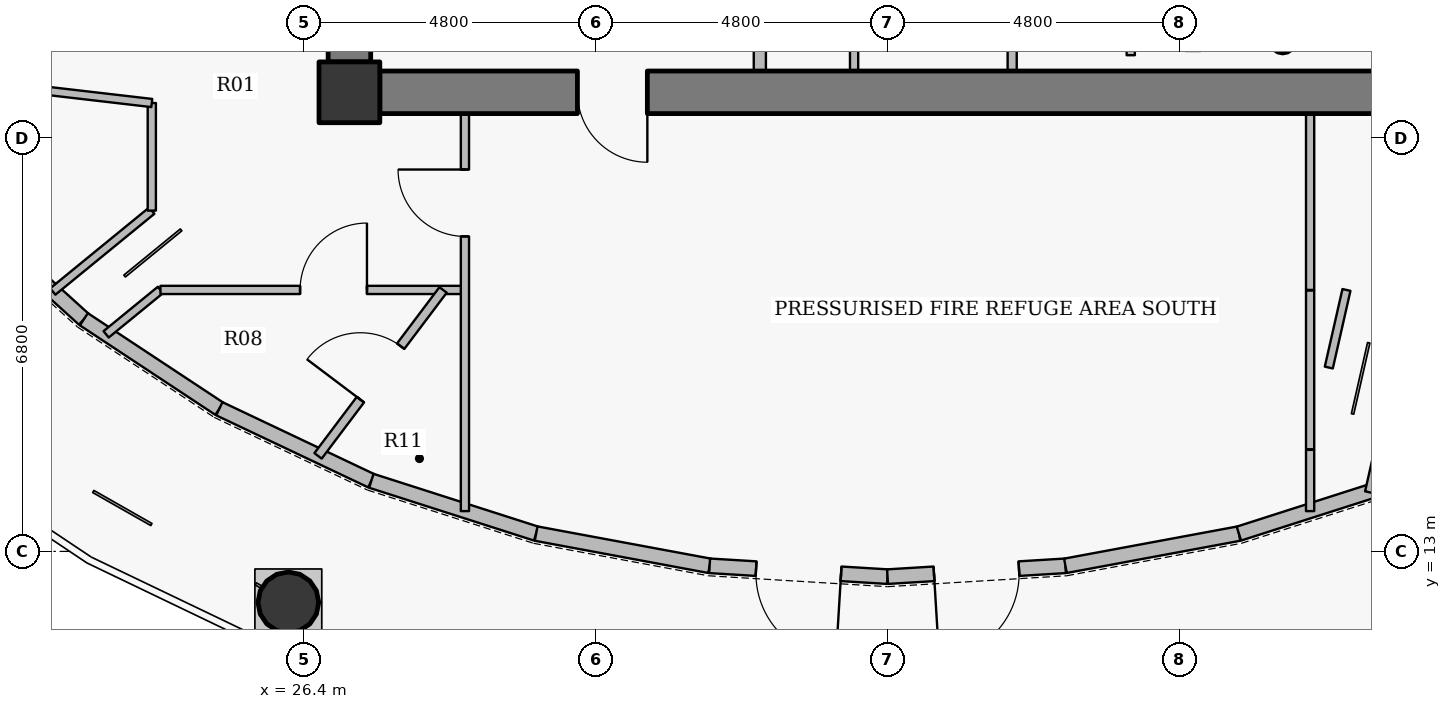
"""IFC4 building model, lengths in metres.
Left out: names, types, materials, properties, quantities, classifications, styles, units other than length and angle.
Written with IfcOpenShell. Run it as: python <this file> out.ifc"""

import sys

from ifc_helpers import new_model, si_unit, direction, frame, frame_2d, origin, origin_2d, place, context, subcontext, project, spatial, rectangle, hollow_circle, extrude, source, transform, mapped, element, fill, save


model = new_model("IFC4")
c1 = context("Model", 3, precision=1e-05, world=origin(), true_north=direction((0.0, 1.0)))
c2 = subcontext(c1, "Body", "Model", "MODEL_VIEW")
j1 = project(units=[si_unit("LENGTHUNIT", "METRE"), si_unit("PLANEANGLEUNIT", "RADIAN")], contexts=[c1])
p1 = place(None, origin())
s1 = spatial("IfcSite", under=j1, at=p1, CompositionType="ELEMENT")
p2 = place(p1, origin())
s2 = spatial("IfcBuilding", under=s1, at=p2, CompositionType="ELEMENT")
p3 = place(p2, frame((0.0, 0.0, 318.0)))
s3 = spatial("IfcBuildingStorey", under=s2, at=p3, CompositionType="ELEMENT", Elevation=318.0)
p4 = place(p3, frame((27.15, 20.55, 0.0), z_axis=(0.0, 0.0, 1.0), x_axis=(1.0, 0.0, 0.0)))
e1 = element("IfcColumn", 1, at=p4, inside=s3, PredefinedType="COLUMN", context=c2, shape_type="SweptSolid", body=[
    extrude(rectangle(XDim=1.0, YDim=1.0, at=origin_2d()), origin(), (0.0, 0.0, 1.0), 6.0),
])
p5 = place(p3, frame((42.5, 21.4, 0.0), z_axis=(0.0, 0.0, 1.0), x_axis=(1.0, 0.0, 0.0)))
e2 = element("IfcColumn", 2, at=p5, inside=s3, PredefinedType="COLUMN", context=c2, shape_type="SweptSolid", body=[
    extrude(hollow_circle(Radius=0.203, WallThickness=0.016, at=origin_2d()), origin(), (0.0, 0.0, 1.0), 6.0),
])
p6 = place(p3, frame((44.35, 20.55, 0.0), z_axis=(0.0, 0.0, 1.0), x_axis=(-1.0, 0.0, 0.0)))
e3 = element("IfcWall", 3, at=p6, inside=s3, PredefinedType="SHEAR", context=c2, shape_type="SweptSolid", body=[
    extrude(rectangle(XDim=16.7, YDim=0.7, at=frame_2d((8.35, 0.0))), origin(), (0.0, 0.0, 1.0), 5.3),
])
p7 = place(p6, frame((12.3, 0.0, 0.0)))
e4 = element("IfcOpeningElement", 4, at=p7, cuts=e3, PredefinedType="OPENING", context=c2, shape_type="SweptSolid", body=[
    extrude(rectangle(XDim=1.15, YDim=2.15, at=origin_2d()), frame((0.575, 0.36, 1.075), z_axis=(0.0, -1.0, 0.0), x_axis=(1.0, 0.0, 0.0)), (0.0, 0.0, 1.0), 0.72),
])
p8 = place(p3, frame((27.15, 21.05, 0.0), z_axis=(0.0, 0.0, 1.0), x_axis=(0.0, 1.0, 0.0)))
e5 = element("IfcWall", 5, at=p8, inside=s3, PredefinedType="SHEAR", context=c2, shape_type="SweptSolid", body=[
    extrude(rectangle(XDim=11.9, YDim=0.7, at=frame_2d((5.95, 0.0))), origin(), (0.0, 0.0, 1.0), 5.3),
])
p9 = place(p8, frame((1.025, 0.0, 0.0)))
e6 = element("IfcOpeningElement", 6, at=p9, cuts=e5, PredefinedType="OPENING", context=c2, shape_type="SweptSolid", body=[
    extrude(rectangle(XDim=1.15, YDim=2.15, at=origin_2d()), frame((0.575, 0.36, 1.075), z_axis=(0.0, -1.0, 0.0), x_axis=(1.0, 0.0, 0.0)), (0.0, 0.0, 1.0), 0.72),
])
p10 = place(p3, frame((26.146, 12.161, 0.0), z_axis=(0.0, 0.0, 1.0), x_axis=(1.0, 0.0, 0.0)))
e7 = element("IfcColumn", 7, at=p10, inside=s3, PredefinedType="COLUMN", context=c2, shape_type="SweptSolid", body=[
    extrude(hollow_circle(Radius=0.5, WallThickness=0.032, at=origin_2d()), origin(), (0.0, 0.0, 1.0), 5.75),
])
p11 = place(p3, frame((22.783, 16.818, 0.0), z_axis=(0.0, 0.0, 1.0), x_axis=(-0.741265131079, 0.671212340058, 0.0)))
e8 = element("IfcWall", 8, at=p11, inside=s3, PredefinedType="SOLIDWALL", context=c2, shape_type="SweptSolid", body=[
    extrude(rectangle(XDim=2.565, YDim=0.24, at=frame_2d((1.282, 0.0))), origin(), (0.0, 0.0, 1.0), 2.832),
])
p12 = place(p3, frame((25.011, 15.346, 0.0), z_axis=(0.0, 0.0, 1.0), x_axis=(-0.834405901953, 0.551150424827, 0.0)))
e9 = element("IfcWall", 9, at=p12, inside=s3, PredefinedType="SOLIDWALL", context=c2, shape_type="SweptSolid", body=[
    extrude(rectangle(XDim=2.67, YDim=0.24, at=frame_2d((1.335, 0.0))), origin(), (0.0, 0.0, 1.0), 2.832),
])
p13 = place(p3, frame((27.511, 14.161, 0.0), z_axis=(0.0, 0.0, 1.0), x_axis=(-0.903637179904, 0.428298782505, 0.0)))
e10 = element("IfcWall", 10, at=p13, inside=s3, PredefinedType="SOLIDWALL", context=c2, shape_type="SweptSolid", body=[
    extrude(rectangle(XDim=2.766, YDim=0.24, at=frame_2d((1.383, 0.0))), origin(), (0.0, 0.0, 1.0), 4.235),
])
p14 = place(p3, frame((30.221, 13.293, 0.0), z_axis=(0.0, 0.0, 1.0), x_axis=(-0.952332464146, 0.305062088326, 0.0)))
e11 = element("IfcWall", 11, at=p14, inside=s3, PredefinedType="SOLIDWALL", context=c2, shape_type="SweptSolid", body=[
    extrude(rectangle(XDim=2.846, YDim=0.24, at=frame_2d((1.423, 0.0))), origin(), (0.0, 0.0, 1.0), 4.235),
])
p15 = place(p3, frame((33.074, 12.763, 0.0), z_axis=(0.0, 0.0, 1.0), x_axis=(-0.983195423776, 0.182556179481, 0.0)))
e12 = element("IfcWall", 12, at=p15, inside=s3, PredefinedType="SOLIDWALL", context=c2, shape_type="SweptSolid", body=[
    extrude(rectangle(XDim=2.902, YDim=0.24, at=frame_2d((1.451, 0.0))), origin(), (0.0, 0.0, 1.0), 5.75),
])
p16 = place(p3, frame((36.0, 12.585, 0.0), z_axis=(0.0, 0.0, 1.0), x_axis=(-0.998149855878, 0.060801852035, 0.0)))
e13 = element("IfcWall", 13, at=p16, inside=s3, PredefinedType="SOLIDWALL", context=c2, shape_type="SweptSolid", body=[
    extrude(rectangle(XDim=2.931, YDim=0.24, at=frame_2d((1.466, 0.0))), origin(), (0.0, 0.0, 1.0), 4.235),
])
p17 = place(p16, frame((0.766, 0.0, 0.0)))
e14 = element("IfcOpeningElement", 14, at=p17, cuts=e13, PredefinedType="OPENING", context=c2, shape_type="SweptSolid", body=[
    extrude(rectangle(XDim=1.4, YDim=2.2, at=origin_2d()), frame((0.7, 0.13, 1.1), z_axis=(0.0, -1.0, 0.0), x_axis=(1.0, 0.0, 0.0)), (0.0, 0.0, 1.0), 0.26),
])
p18 = place(p3, frame((38.926, 12.763, 0.0), z_axis=(0.0, 0.0, 1.0), x_axis=(-0.998149855878, -0.060801852035, 0.0)))
e15 = element("IfcWall", 15, at=p18, inside=s3, PredefinedType="SOLIDWALL", context=c2, shape_type="SweptSolid", body=[
    extrude(rectangle(XDim=2.931, YDim=0.24, at=frame_2d((1.466, 0.0))), origin(), (0.0, 0.0, 1.0), 4.235),
])
p19 = place(p18, frame((0.766, 0.0, 0.0)))
e16 = element("IfcOpeningElement", 16, at=p19, cuts=e15, PredefinedType="OPENING", context=c2, shape_type="SweptSolid", body=[
    extrude(rectangle(XDim=1.4, YDim=2.2, at=origin_2d()), frame((0.7, 0.13, 1.1), z_axis=(0.0, -1.0, 0.0), x_axis=(1.0, 0.0, 0.0)), (0.0, 0.0, 1.0), 0.26),
])
p20 = place(p3, frame((41.779, 13.293, 0.0), z_axis=(0.0, 0.0, 1.0), x_axis=(-0.983195423776, -0.182556179481, 0.0)))
e17 = element("IfcWall", 17, at=p20, inside=s3, PredefinedType="SOLIDWALL", context=c2, shape_type="SweptSolid", body=[
    extrude(rectangle(XDim=2.902, YDim=0.24, at=frame_2d((1.451, 0.0))), origin(), (0.0, 0.0, 1.0), 4.235),
])
p21 = place(p3, frame((44.489, 14.161, 0.0), z_axis=(0.0, 0.0, 1.0), x_axis=(-0.952332464146, -0.305062088326, 0.0)))
e18 = element("IfcWall", 18, at=p21, inside=s3, PredefinedType="SOLIDWALL", context=c2, shape_type="SweptSolid", body=[
    extrude(rectangle(XDim=2.846, YDim=0.24, at=frame_2d((1.423, 0.0))), origin(), (0.0, 0.0, 1.0), 2.832),
])
p22 = place(p3, frame((23.149, 16.57, 0.0), z_axis=(0.0, 0.0, 1.0), x_axis=(0.774324787676, 0.632788371568, 0.0)))
e19 = element("IfcWall", 19, at=p22, inside=s3, PredefinedType="PARTITIONING", context=c2, shape_type="SweptSolid", body=[
    extrude(rectangle(XDim=1.154, YDim=0.135, at=frame_2d((0.577, 0.0))), origin(), (0.0, 0.0, 1.0), 5.335),
])
p23 = place(p3, frame((24.042, 17.3, 0.0), z_axis=(0.0, 0.0, 1.0), x_axis=(1.0, 0.0, 0.0)))
e20 = element("IfcWall", 20, at=p23, inside=s3, PredefinedType="PARTITIONING", context=c2, shape_type="SweptSolid", body=[
    extrude(rectangle(XDim=5.008, YDim=0.135, at=frame_2d((2.504, 0.0))), origin(), (0.0, 0.0, 1.0), 5.335),
])
p24 = place(p23, frame((2.296, 0.0, 0.0)))
e21 = element("IfcOpeningElement", 21, at=p24, cuts=e20, PredefinedType="OPENING", context=c2, shape_type="SweptSolid", body=[
    extrude(rectangle(XDim=1.1, YDim=2.15, at=origin_2d()), frame((0.55, 0.078, 1.075), z_axis=(0.0, -1.0, 0.0), x_axis=(1.0, 0.0, 0.0)), (0.0, 0.0, 1.0), 0.155),
])
p25 = place(p3, frame((26.634, 14.571, 0.0), z_axis=(0.0, 0.0, 1.0), x_axis=(0.601804670705, 0.79864331107, 0.0)))
e22 = element("IfcWall", 22, at=p25, inside=s3, PredefinedType="PARTITIONING", context=c2, shape_type="SweptSolid", body=[
    extrude(rectangle(XDim=3.417, YDim=0.15, at=frame_2d((1.708, 0.0))), origin(), (0.0, 0.0, 1.0), 5.335),
])
p26 = place(p25, frame((1.158, 0.0, 0.0)))
e23 = element("IfcOpeningElement", 23, at=p26, cuts=e22, PredefinedType="OPENING", context=c2, shape_type="SweptSolid", body=[
    extrude(rectangle(XDim=1.1, YDim=2.15, at=origin_2d()), frame((0.55, 0.085, 1.075), z_axis=(0.0, -1.0, 0.0), x_axis=(1.0, 0.0, 0.0)), (0.0, 0.0, 1.0), 0.17),
])
p27 = place(p3, frame((29.05, 13.663, 0.0), z_axis=(0.0, 0.0, 1.0), x_axis=(0.0, 1.0, 0.0)))
e24 = element("IfcWall", 24, at=p27, inside=s3, PredefinedType="PARTITIONING", context=c2, shape_type="SweptSolid", body=[
    extrude(rectangle(XDim=6.537, YDim=0.135, at=frame_2d((3.269, 0.0))), origin(), (0.0, 0.0, 1.0), 4.235),
])
p28 = place(p27, frame((4.517, 0.0, 0.0)))
e25 = element("IfcOpeningElement", 25, at=p28, cuts=e24, PredefinedType="OPENING", context=c2, shape_type="SweptSolid", body=[
    extrude(rectangle(XDim=1.1, YDim=2.15, at=origin_2d()), frame((0.55, 0.078, 1.075), z_axis=(0.0, -1.0, 0.0), x_axis=(1.0, 0.0, 0.0)), (0.0, 0.0, 1.0), 0.155),
])
p29 = place(p3, frame((33.9, 20.9, 0.0), z_axis=(0.0, 0.0, 1.0), x_axis=(0.0, 1.0, 0.0)))
e26 = element("IfcWall", 26, at=p29, inside=s3, PredefinedType="PARTITIONING", context=c2, shape_type="SweptSolid", body=[
    extrude(rectangle(XDim=6.65, YDim=0.2, at=frame_2d((3.325, 0.0))), origin(), (0.0, 0.0, 1.0), 5.335),
])
p30 = place(p29, frame((1.323, 0.0, 0.0)))
e27 = element("IfcOpeningElement", 27, at=p30, cuts=e26, PredefinedType="OPENING", context=c2, shape_type="SweptSolid", body=[
    extrude(rectangle(XDim=1.15, YDim=2.15, at=origin_2d()), frame((0.575, 0.11, 1.075), z_axis=(0.0, -1.0, 0.0), x_axis=(1.0, 0.0, 0.0)), (0.0, 0.0, 1.0), 0.22),
])
p31 = place(p3, frame((35.45, 20.9, 0.0), z_axis=(0.0, 0.0, 1.0), x_axis=(0.0, 1.0, 0.0)))
e28 = element("IfcWall", 28, at=p31, inside=s3, PredefinedType="PARTITIONING", context=c2, shape_type="SweptSolid", body=[
    extrude(rectangle(XDim=2.8, YDim=0.135, at=frame_2d((1.4, 0.0))), origin(), (0.0, 0.0, 1.0), 5.335),
])
p32 = place(p31, frame((0.85, 0.0, 0.0)))
e29 = element("IfcOpeningElement", 29, at=p32, cuts=e28, PredefinedType="OPENING", context=c2, shape_type="SweptSolid", body=[
    extrude(rectangle(XDim=1.1, YDim=2.15, at=origin_2d()), frame((0.55, 0.078, 1.075), z_axis=(0.0, -1.0, 0.0), x_axis=(1.0, 0.0, 0.0)), (0.0, 0.0, 1.0), 0.155),
])
p33 = place(p3, frame((38.05, 20.38, 0.0), z_axis=(0.0, 0.0, 1.0), x_axis=(0.0, 1.0, 0.0)))
e30 = element("IfcWall", 30, at=p33, inside=s3, PredefinedType="PARTITIONING", context=c2, shape_type="SweptSolid", body=[
    extrude(rectangle(XDim=3.32, YDim=0.15, at=frame_2d((1.66, 0.0))), origin(), (0.0, 0.0, 1.0), 5.285),
])
p34 = place(p3, frame((42.95, 13.663, 0.0), z_axis=(0.0, 0.0, 1.0), x_axis=(0.0, 1.0, 0.0)))
e31 = element("IfcWall", 31, at=p34, inside=s3, PredefinedType="PARTITIONING", context=c2, shape_type="SweptSolid", body=[
    extrude(rectangle(XDim=1.007, YDim=0.135, at=frame_2d((0.504, 0.0))), origin(), (0.0, 0.0, 1.0), 5.75),
])
p35 = place(p3, frame((42.95, 17.3, 0.0), z_axis=(0.0, 0.0, 1.0), x_axis=(0.0, 1.0, 0.0)))
e32 = element("IfcWall", 32, at=p35, inside=s3, PredefinedType="PARTITIONING", context=c2, shape_type="SweptSolid", body=[
    extrude(rectangle(XDim=2.9, YDim=0.135, at=frame_2d((1.45, 0.0))), origin(), (0.0, 0.0, 1.0), 5.75),
])
p36 = place(p3, frame((40.0, 23.7, 0.0), z_axis=(0.0, 0.0, 1.0), x_axis=(0.0, -1.0, 0.0)))
e33 = element("IfcWall", 33, at=p36, inside=s3, PredefinedType="PARTITIONING", context=c2, shape_type="SweptSolid", body=[
    extrude(rectangle(XDim=2.54, YDim=0.135, at=frame_2d((1.27, 0.0))), origin(), (0.0, 0.0, 1.0), 5.285),
])
p37 = place(p3, frame((42.95, 17.29, 0.0), z_axis=(0.0, 0.0, 1.0), x_axis=(0.0, -1.0, 0.0)))
e34 = element("IfcWall", 34, at=p37, inside=s3, PredefinedType="PARTITIONING", context=c2, shape_type="SweptSolid", body=[
    extrude(rectangle(XDim=2.61, YDim=0.135, at=frame_2d((1.305, 0.0))), origin(), (0.0, 0.0, 1.0), 5.75),
])
p38 = place(p3, frame((22.272, 17.274, 0.0), z_axis=(0.0, 0.0, 1.0), x_axis=(0.774324461251, 0.632788771003, 0.0)))
e35 = element("IfcWall", 35, at=p38, inside=s3, PredefinedType="PARTITIONING", context=c2, shape_type="SweptSolid", body=[
    extrude(rectangle(XDim=2.103, YDim=0.135, at=frame_2d((1.051, 0.0))), origin(), (0.0, 0.0, 1.0), 5.75),
])
p39 = place(p3, frame((23.9, 18.604, 0.0), z_axis=(0.0, 0.0, 1.0), x_axis=(0.0, 1.0, 0.0)))
e36 = element("IfcWall", 36, at=p39, inside=s3, PredefinedType="PARTITIONING", context=c2, shape_type="SweptSolid", body=[
    extrude(rectangle(XDim=1.77, YDim=0.135, at=frame_2d((0.885, 0.0))), origin(), (0.0, 0.0, 1.0), 5.75),
])
p40 = place(p3, frame((23.9, 20.374, 0.0), z_axis=(0.0, 0.0, 1.0), x_axis=(-0.993315464897, 0.115431309428, 0.0)))
e37 = element("IfcWall", 37, at=p40, inside=s3, PredefinedType="PARTITIONING", context=c2, shape_type="SweptSolid", body=[
    extrude(rectangle(XDim=4.833, YDim=0.135, at=frame_2d((2.417, 0.0))), origin(), (0.0, 0.0, 1.0), 5.75),
])
p41 = place(p3, frame((26.8, 21.04, 0.0), z_axis=(0.0, 0.0, 1.0), x_axis=(0.0, -1.0, 0.0)))
e38 = element("IfcWall", 38, at=p41, inside=s3, PredefinedType="PARTITIONING", context=c2, shape_type="SweptSolid", body=[
    extrude(rectangle(XDim=0.84, YDim=0.135, at=frame_2d((0.42, 0.0))), origin(), (0.0, 0.0, 1.0), 2.832),
])
p42 = place(p3, frame((27.107, 20.2, 0.0), z_axis=(0.0, 0.0, 1.0), x_axis=(1.0, 0.0, 0.0)))
e39 = element("IfcWall", 39, at=p42, inside=s3, PredefinedType="PARTITIONING", context=c2, shape_type="SweptSolid", body=[
    extrude(rectangle(XDim=0.532, YDim=0.135, at=frame_2d((0.266, 0.0))), origin(), (0.0, 0.0, 1.0), 4.235),
])
p43 = place(p3, frame((44.676, 17.3, 0.0), z_axis=(0.0, 0.0, 1.0), x_axis=(-0.221565425892, -0.975145508142, 0.0)))
e40 = element("IfcWall", 40, at=p43, inside=s3, PredefinedType="PARTITIONING", context=c2, shape_type="SweptSolid", body=[
    extrude(rectangle(XDim=3.411, YDim=0.135, at=frame_2d((1.706, 0.0))), origin(), (0.0, 0.0, 1.0), 5.75),
])
p44 = place(p3, frame((43.258, 16.024, 0.0), z_axis=(0.0, 0.0, 1.0), x_axis=(0.221588855945, 0.975140184241, 0.0)))
e41 = element("IfcWall", 41, at=p44, inside=s3, PredefinedType="PARTITIONING", context=c2, shape_type="SweptSolid", body=[
    extrude(rectangle(XDim=1.309, YDim=0.135, at=frame_2d((0.654, 0.0))), origin(), (0.0, 0.0, 1.0), 5.75),
])
m1 = source(origin(), c2, "Body", "SweptSolid", [
    extrude(rectangle(XDim=1.4, YDim=2.2, at=origin_2d()), frame((0.7, 0.025, 1.1), z_axis=(0.0, -1.0, 0.0), x_axis=(1.0, 0.0, 0.0)), (0.0, 0.0, 1.0), 0.05),
])
p45 = place(p17, origin())
e42 = element("IfcDoor", 42, at=p45, inside=s3, OperationType="SINGLE_SWING_LEFT", PredefinedType="DOOR", context=c2, shape_type="MappedRepresentation", body=[
    mapped(m1, transform((0.0, 0.0, 0.0), x_axis=(1.0, 0.0, 0.0), y_axis=(0.0, 1.0, 0.0), z_axis=(0.0, 0.0, 1.0), scale=1.0)),
])
fill(e14, e42)
p46 = place(p19, origin())
e43 = element("IfcDoor", 43, at=p46, inside=s3, OperationType="SINGLE_SWING_RIGHT", PredefinedType="DOOR", context=c2, shape_type="MappedRepresentation", body=[
    mapped(m1, transform((0.0, 0.0, 0.0), x_axis=(1.0, 0.0, 0.0), y_axis=(0.0, 1.0, 0.0), z_axis=(0.0, 0.0, 1.0), scale=1.0)),
])
fill(e16, e43)
m2 = source(origin(), c2, "Body", "SweptSolid", [
    extrude(rectangle(XDim=1.15, YDim=2.15, at=origin_2d()), frame((0.575, 0.025, 1.075), z_axis=(0.0, -1.0, 0.0), x_axis=(1.0, 0.0, 0.0)), (0.0, 0.0, 1.0), 0.05),
])
p47 = place(p7, origin())
e44 = element("IfcDoor", 44, at=p47, inside=s3, OperationType="SINGLE_SWING_LEFT", PredefinedType="DOOR", context=c2, shape_type="MappedRepresentation", body=[
    mapped(m2, transform((0.0, 0.0, 0.0), x_axis=(1.0, 0.0, 0.0), y_axis=(0.0, 1.0, 0.0), z_axis=(0.0, 0.0, 1.0), scale=1.0)),
])
fill(e4, e44)
m3 = source(origin(), c2, "Body", "SweptSolid", [
    extrude(rectangle(XDim=1.1, YDim=2.15, at=origin_2d()), frame((0.55, 0.025, 1.075), z_axis=(0.0, -1.0, 0.0), x_axis=(1.0, 0.0, 0.0)), (0.0, 0.0, 1.0), 0.05),
])
p48 = place(p28, origin())
e45 = element("IfcDoor", 45, at=p48, inside=s3, OperationType="SINGLE_SWING_RIGHT", PredefinedType="DOOR", context=c2, shape_type="MappedRepresentation", body=[
    mapped(m3, transform((0.0, 0.0, 0.0), x_axis=(1.0, 0.0, 0.0), y_axis=(0.0, 1.0, 0.0), z_axis=(0.0, 0.0, 1.0), scale=1.0)),
])
fill(e25, e45)
p49 = place(p24, origin())
e46 = element("IfcDoor", 46, at=p49, inside=s3, OperationType="SINGLE_SWING_RIGHT", PredefinedType="DOOR", context=c2, shape_type="MappedRepresentation", body=[
    mapped(m3, transform((0.0, 0.0, 0.0), x_axis=(1.0, 0.0, 0.0), y_axis=(0.0, 1.0, 0.0), z_axis=(0.0, 0.0, 1.0), scale=1.0)),
])
fill(e21, e46)
p50 = place(p26, origin())
e47 = element("IfcDoor", 47, at=p50, inside=s3, OperationType="SINGLE_SWING_LEFT", PredefinedType="DOOR", context=c2, shape_type="MappedRepresentation", body=[
    mapped(m3, transform((0.0, 0.0, 0.0), x_axis=(1.0, 0.0, 0.0), y_axis=(0.0, 1.0, 0.0), z_axis=(0.0, 0.0, 1.0), scale=1.0)),
])
fill(e23, e47)
save(model, sys.argv[1])
